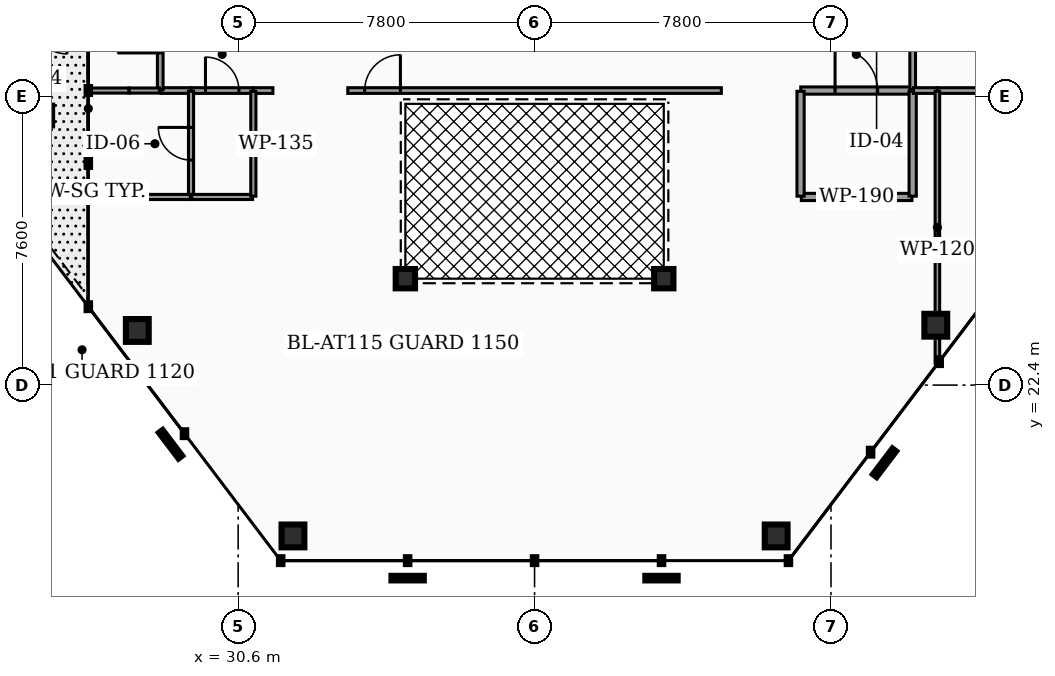
"""IFC4 building model, lengths in metres.
Left out: names, types, materials, properties, quantities, classifications, styles, units other than length and angle.
Written with IfcOpenShell. Run it as: python <this file> out.ifc"""

import sys

from ifc_helpers import new_model, si_unit, direction, frame, frame_2d, origin, origin_2d, place, context, subcontext, project, spatial, rectangle, hollow_rectangle, hollow_circle, extrude, element, fill, save


model = new_model("IFC4")
c1 = context("Model", 3, precision=1e-05, world=origin(), true_north=direction((0.0, 1.0)))
c2 = subcontext(c1, "Body", "Model", "MODEL_VIEW")
j1 = project(units=[si_unit("LENGTHUNIT", "METRE"), si_unit("PLANEANGLEUNIT", "RADIAN")], contexts=[c1])
p1 = place(None, origin())
s1 = spatial("IfcSite", under=j1, at=p1, CompositionType="ELEMENT")
p2 = place(p1, origin())
s2 = spatial("IfcBuilding", under=s1, at=p2, CompositionType="ELEMENT")
p3 = place(p2, frame((0.0, 0.0, 199.92)))
s3 = spatial("IfcBuildingStorey", under=s2, at=p3, CompositionType="ELEMENT", Elevation=199.92)
for number, where, z_axis, x_axis in (
    (1, (27.946, 23.837, 0.0), (0.0, 0.0, 1.0), (1.0, 0.0, 0.0)),
    (2, (32.042, 18.431, 0.0), (0.0, 0.0, 1.0), (1.0, 0.0, 0.0)),
    (3, (44.758, 18.431, 0.0), (0.0, 0.0, 1.0), (1.0, 0.0, 0.0)),
    (4, (48.958, 23.975, 0.0), (0.0, 0.0, 1.0), (1.0, 0.0, 0.0)),
):
    element("IfcColumn", number, at=place(p3, frame(where, z_axis=z_axis, x_axis=x_axis)), inside=s3, PredefinedType="COLUMN", context=c2, shape_type="SweptSolid", body=[
        extrude(hollow_rectangle(XDim=0.6, YDim=0.6, WallThickness=0.03, at=origin_2d()), origin(), (0.0, 0.0, 1.0), 4.12),
    ])
for number, where, z_axis, x_axis in (
    (5, (35.0, 25.2, 0.0), (0.0, 0.0, 1.0), (1.0, 0.0, 0.0)),
    (6, (41.8, 25.2, 0.0), (0.0, 0.0, 1.0), (1.0, 0.0, 0.0)),
):
    element("IfcColumn", number, at=place(p3, frame(where, z_axis=z_axis, x_axis=x_axis)), inside=s3, PredefinedType="COLUMN", context=c2, shape_type="SweptSolid", body=[
        extrude(hollow_circle(Radius=0.254, WallThickness=0.02, at=origin_2d()), origin(), (0.0, 0.0, 1.0), 4.12),
    ])
p4 = place(p3, frame((23.744, 29.494, 0.0), z_axis=(0.0, 0.0, 1.0), x_axis=(1.0, 0.0, 0.0)))
e7 = element("IfcWall", 7, at=p4, inside=s3, PredefinedType="PARAPET", context=c2, shape_type="SweptSolid", body=[
    extrude(rectangle(XDim=2.0, YDim=0.6, at=frame_2d((1.0, 0.0))), origin(), (0.0, 0.0, 1.0), 0.6),
])
p5 = place(p3, frame((45.405, 30.15, 0.0), z_axis=(0.0, 0.0, 1.0), x_axis=(1.0, 0.0, 0.0)))
e8 = element("IfcWall", 8, at=p5, inside=s3, PredefinedType="PARTITIONING", context=c2, shape_type="SweptSolid", body=[
    extrude(rectangle(XDim=2.925, YDim=0.19, at=frame_2d((1.462, 0.0))), origin(), (0.0, 0.0, 1.0), 3.077),
])
p6 = place(p5, frame((0.903, 0.0, 0.0)))
e9 = element("IfcOpeningElement", 9, at=p6, cuts=e8, PredefinedType="OPENING", context=c2, shape_type="SweptSolid", body=[
    extrude(rectangle(XDim=1.12, YDim=2.05, at=frame_2d((0.56, 1.025))), frame((0.0, 0.105, 0.0), z_axis=(0.0, -1.0, 0.0), x_axis=(1.0, 0.0, 0.0)), (0.0, 0.0, 1.0), 0.21),
])
p7 = place(p3, frame((48.35, 30.17, 0.0), z_axis=(0.0, 0.0, 1.0), x_axis=(0.0, 1.0, 0.0)))
e10 = element("IfcWall", 10, at=p7, inside=s3, PredefinedType="PARTITIONING", context=c2, shape_type="SweptSolid", body=[
    extrude(rectangle(XDim=3.06, YDim=0.15, at=frame_2d((1.53, 0.0))), origin(), (0.0, 0.0, 1.0), 3.077),
])
p8 = place(p7, frame((1.06, 0.0, 0.0)))
e11 = element("IfcOpeningElement", 11, at=p8, cuts=e10, PredefinedType="OPENING", context=c2, shape_type="SweptSolid", body=[
    extrude(rectangle(XDim=0.94, YDim=2.05, at=frame_2d((0.47, 1.025))), frame((0.0, 0.085, 0.0), z_axis=(0.0, -1.0, 0.0), x_axis=(1.0, 0.0, 0.0)), (0.0, 0.0, 1.0), 0.17),
])
p9 = place(p3, frame((29.365, 30.15, 0.0), z_axis=(0.0, 0.0, 1.0), x_axis=(1.0, 0.0, 0.0)))
e12 = element("IfcWall", 12, at=p9, inside=s3, PredefinedType="PARTITIONING", context=c2, shape_type="SweptSolid", body=[
    extrude(rectangle(XDim=1.63, YDim=0.15, at=frame_2d((0.815, 0.0))), origin(), (0.0, 0.0, 1.0), 3.077),
])
p10 = place(p9, frame((0.375, 0.0, 0.0)))
e13 = element("IfcOpeningElement", 13, at=p10, cuts=e12, PredefinedType="OPENING", context=c2, shape_type="SweptSolid", body=[
    extrude(rectangle(XDim=0.88, YDim=2.05, at=frame_2d((0.44, 1.025))), frame((0.0, 0.085, 0.0), z_axis=(0.0, -1.0, 0.0), x_axis=(1.0, 0.0, 0.0)), (0.0, 0.0, 1.0), 0.17),
])
p11 = place(p3, frame((28.57, 30.15, 0.0), z_axis=(0.0, 0.0, 1.0), x_axis=(1.0, 0.0, 0.0)))
e14 = element("IfcWall", 14, at=p11, inside=s3, PredefinedType="PARTITIONING", context=c2, shape_type="SweptSolid", body=[
    extrude(rectangle(XDim=0.785, YDim=0.15, at=frame_2d((0.393, 0.0))), origin(), (0.0, 0.0, 1.0), 3.077),
])
p12 = place(p3, frame((33.485, 30.15, 0.0), z_axis=(0.0, 0.0, 1.0), x_axis=(1.0, 0.0, 0.0)))
e15 = element("IfcWall", 15, at=p12, inside=s3, PredefinedType="PARTITIONING", context=c2, shape_type="SweptSolid", body=[
    extrude(rectangle(XDim=9.83, YDim=0.15, at=frame_2d((4.915, 0.0))), origin(), (0.0, 0.0, 1.0), 3.077),
])
p13 = place(p12, frame((0.445, 0.0, 0.0)))
e16 = element("IfcOpeningElement", 16, at=p13, cuts=e15, PredefinedType="OPENING", context=c2, shape_type="SweptSolid", body=[
    extrude(rectangle(XDim=0.94, YDim=2.05, at=frame_2d((0.47, 1.025))), frame((0.0, 0.085, 0.0), z_axis=(0.0, -1.0, 0.0), x_axis=(1.0, 0.0, 0.0)), (0.0, 0.0, 1.0), 0.17),
])
p14 = place(p3, frame((31.005, 30.15, 0.0), z_axis=(0.0, 0.0, 1.0), x_axis=(1.0, 0.0, 0.0)))
e17 = element("IfcWall", 17, at=p14, inside=s3, PredefinedType="PARTITIONING", context=c2, shape_type="SweptSolid", body=[
    extrude(rectangle(XDim=0.51, YDim=0.15, at=frame_2d((0.255, 0.0))), origin(), (0.0, 0.0, 1.0), 3.077),
])
p15 = place(p3, frame((28.55, 30.17, 0.0), z_axis=(0.0, 0.0, 1.0), x_axis=(0.0, 1.0, 0.0)))
e18 = element("IfcWall", 18, at=p15, inside=s3, PredefinedType="PARTITIONING", context=c2, shape_type="SweptSolid", body=[
    extrude(rectangle(XDim=3.06, YDim=0.15, at=frame_2d((1.53, 0.0))), origin(), (0.0, 0.0, 1.0), 3.077),
])
p16 = place(p15, frame((0.97, 0.0, 0.0)))
e19 = element("IfcOpeningElement", 19, at=p16, cuts=e18, PredefinedType="OPENING", context=c2, shape_type="SweptSolid", body=[
    extrude(rectangle(XDim=1.12, YDim=2.05, at=frame_2d((0.56, 1.025))), frame((0.0, 0.085, 0.0), z_axis=(0.0, -1.0, 0.0), x_axis=(1.0, 0.0, 0.0)), (0.0, 0.0, 1.0), 0.17),
])
p17 = place(p3, frame((45.42, 27.35, 0.0), z_axis=(0.0, 0.0, 1.0), x_axis=(1.0, 0.0, 0.0)))
e20 = element("IfcWall", 20, at=p17, inside=s3, PredefinedType="PARTITIONING", context=c2, shape_type="SweptSolid", body=[
    extrude(rectangle(XDim=2.91, YDim=0.19, at=frame_2d((1.455, 0.0))), origin(), (0.0, 0.0, 1.0), 3.077),
])
for number, where, z_axis, x_axis in (
    (21, (45.4, 27.37, 0.0), (0.0, 0.0, 1.0), (0.0, 1.0, 0.0)),
    (22, (48.35, 27.37, 0.0), (0.0, 0.0, 1.0), (0.0, 1.0, 0.0)),
):
    element("IfcWall", number, at=place(p3, frame(where, z_axis=z_axis, x_axis=x_axis)), inside=s3, PredefinedType="PARTITIONING", context=c2, shape_type="SweptSolid", body=[
        extrude(rectangle(XDim=2.76, YDim=0.19, at=frame_2d((1.38, 0.0))), origin(), (0.0, 0.0, 1.0), 3.077),
    ])
p18 = place(p3, frame((48.37, 30.15, 0.0), z_axis=(0.0, 0.0, 1.0), x_axis=(1.0, 0.0, 0.0)))
e23 = element("IfcWall", 23, at=p18, inside=s3, PredefinedType="PARTITIONING", context=c2, shape_type="SweptSolid", body=[
    extrude(rectangle(XDim=0.625, YDim=0.15, at=frame_2d((0.312, 0.0))), origin(), (0.0, 0.0, 1.0), 3.077),
])
p19 = place(p3, frame((49.005, 30.15, 0.0), z_axis=(0.0, 0.0, 1.0), x_axis=(1.0, 0.0, 0.0)))
e24 = element("IfcWall", 24, at=p19, inside=s3, PredefinedType="PARTITIONING", context=c2, shape_type="SweptSolid", body=[
    extrude(rectangle(XDim=1.345, YDim=0.15, at=frame_2d((0.673, 0.0))), origin(), (0.0, 0.0, 1.0), 3.077),
])
p20 = place(p3, frame((29.36, 27.37, 0.0), z_axis=(0.0, 0.0, 1.0), x_axis=(0.0, 1.0, 0.0)))
e25 = element("IfcWall", 25, at=p20, inside=s3, PredefinedType="PARTITIONING", context=c2, shape_type="SweptSolid", body=[
    extrude(rectangle(XDim=2.76, YDim=0.135, at=frame_2d((1.38, 0.0))), origin(), (0.0, 0.0, 1.0), 3.077),
])
p21 = place(p20, frame((0.95, 0.0, 0.0)))
e26 = element("IfcOpeningElement", 26, at=p21, cuts=e25, PredefinedType="OPENING", context=c2, shape_type="SweptSolid", body=[
    extrude(rectangle(XDim=0.86, YDim=2.05, at=frame_2d((0.43, 1.025))), frame((0.0, 0.077, 0.0), z_axis=(0.0, -1.0, 0.0), x_axis=(1.0, 0.0, 0.0)), (0.0, 0.0, 1.0), 0.155),
])
p22 = place(p3, frame((29.38, 27.35, 0.0), z_axis=(0.0, 0.0, 1.0), x_axis=(1.0, 0.0, 0.0)))
e27 = element("IfcWall", 27, at=p22, inside=s3, PredefinedType="PARTITIONING", context=c2, shape_type="SweptSolid", body=[
    extrude(rectangle(XDim=1.6, YDim=0.135, at=frame_2d((0.8, 0.0))), origin(), (0.0, 0.0, 1.0), 3.077),
])
p23 = place(p3, frame((31.0, 27.37, 0.0), z_axis=(0.0, 0.0, 1.0), x_axis=(0.0, 1.0, 0.0)))
e28 = element("IfcWall", 28, at=p23, inside=s3, PredefinedType="PARTITIONING", context=c2, shape_type="SweptSolid", body=[
    extrude(rectangle(XDim=2.76, YDim=0.135, at=frame_2d((1.38, 0.0))), origin(), (0.0, 0.0, 1.0), 3.077),
])
p24 = place(p3, frame((27.73, 27.35, 0.0), z_axis=(0.0, 0.0, 1.0), x_axis=(1.0, 0.0, 0.0)))
e29 = element("IfcWall", 29, at=p24, inside=s3, PredefinedType="PARTITIONING", context=c2, shape_type="SweptSolid", body=[
    extrude(rectangle(XDim=1.61, YDim=0.135, at=frame_2d((0.805, 0.0))), origin(), (0.0, 0.0, 1.0), 3.077),
])
for number, where, z_axis, x_axis in (
    (30, (26.673, 27.35, 0.0), (0.0, 0.0, 1.0), (1.0, 0.0, 0.0)),
    (31, (26.673, 30.15, 0.0), (0.0, 0.0, 1.0), (1.0, 0.0, 0.0)),
):
    element("IfcWall", number, at=place(p3, frame(where, z_axis=z_axis, x_axis=x_axis)), inside=s3, PredefinedType="PARTITIONING", context=c2, shape_type="SweptSolid", body=[
        extrude(rectangle(XDim=1.057, YDim=0.135, at=frame_2d((0.529, 0.0))), origin(), (0.0, 0.0, 1.0), 3.077),
    ])
p25 = place(p3, frame((27.73, 30.15, 0.0), z_axis=(0.0, 0.0, 1.0), x_axis=(1.0, 0.0, 0.0)))
e32 = element("IfcWall", 32, at=p25, inside=s3, PredefinedType="PARTITIONING", context=c2, shape_type="SweptSolid", body=[
    extrude(rectangle(XDim=0.8, YDim=0.135, at=frame_2d((0.4, 0.0))), origin(), (0.0, 0.0, 1.0), 3.077),
])
p26 = place(p3, frame((49.0, 22.969, 0.0), z_axis=(0.0, 0.0, 1.0), x_axis=(0.0, 1.0, 0.0)))
e33 = element("IfcWall", 33, at=p26, inside=s3, PredefinedType="PARTITIONING", context=c2, shape_type="SweptSolid", body=[
    extrude(rectangle(XDim=7.161, YDim=0.12, at=frame_2d((3.58, 0.0))), origin(), (0.0, 0.0, 1.0), 3.077),
])
p27 = place(p6, origin())
e34 = element("IfcDoor", 34, at=p27, inside=s3, OperationType="SINGLE_SWING_LEFT", PredefinedType="DOOR", context=c2, shape_type="SweptSolid", body=[
    extrude(rectangle(XDim=1.12, YDim=2.05, at=frame_2d((0.56, 1.025))), frame((0.0, 0.025, 0.0), z_axis=(0.0, -1.0, 0.0), x_axis=(1.0, 0.0, 0.0)), (0.0, 0.0, 1.0), 0.05),
])
fill(e9, e34)
p28 = place(p10, origin())
e35 = element("IfcDoor", 35, at=p28, inside=s3, OperationType="SINGLE_SWING_LEFT", PredefinedType="DOOR", context=c2, shape_type="SweptSolid", body=[
    extrude(rectangle(XDim=0.88, YDim=2.05, at=frame_2d((0.44, 1.025))), frame((0.0, 0.025, 0.0), z_axis=(0.0, -1.0, 0.0), x_axis=(1.0, 0.0, 0.0)), (0.0, 0.0, 1.0), 0.05),
])
fill(e13, e35)
p29 = place(p13, origin())
e36 = element("IfcDoor", 36, at=p29, inside=s3, OperationType="SINGLE_SWING_RIGHT", PredefinedType="DOOR", context=c2, shape_type="SweptSolid", body=[
    extrude(rectangle(XDim=0.94, YDim=2.05, at=frame_2d((0.47, 1.025))), frame((0.0, 0.025, 0.0), z_axis=(0.0, -1.0, 0.0), x_axis=(1.0, 0.0, 0.0)), (0.0, 0.0, 1.0), 0.05),
])
fill(e16, e36)
p30 = place(p16, origin())
e37 = element("IfcDoor", 37, at=p30, inside=s3, OperationType="SINGLE_SWING_LEFT", PredefinedType="DOOR", context=c2, shape_type="SweptSolid", body=[
    extrude(rectangle(XDim=1.12, YDim=2.05, at=frame_2d((0.56, 1.025))), frame((0.0, 0.025, 0.0), z_axis=(0.0, -1.0, 0.0), x_axis=(1.0, 0.0, 0.0)), (0.0, 0.0, 1.0), 0.05),
])
fill(e19, e37)
p31 = place(p21, origin())
e38 = element("IfcDoor", 38, at=p31, inside=s3, OperationType="SINGLE_SWING_RIGHT", PredefinedType="DOOR", context=c2, shape_type="SweptSolid", body=[
    extrude(rectangle(XDim=0.86, YDim=2.05, at=frame_2d((0.43, 1.025))), frame((0.0, 0.025, 0.0), z_axis=(0.0, -1.0, 0.0), x_axis=(1.0, 0.0, 0.0)), (0.0, 0.0, 1.0), 0.05),
])
fill(e26, e38)
save(model, sys.argv[1])
